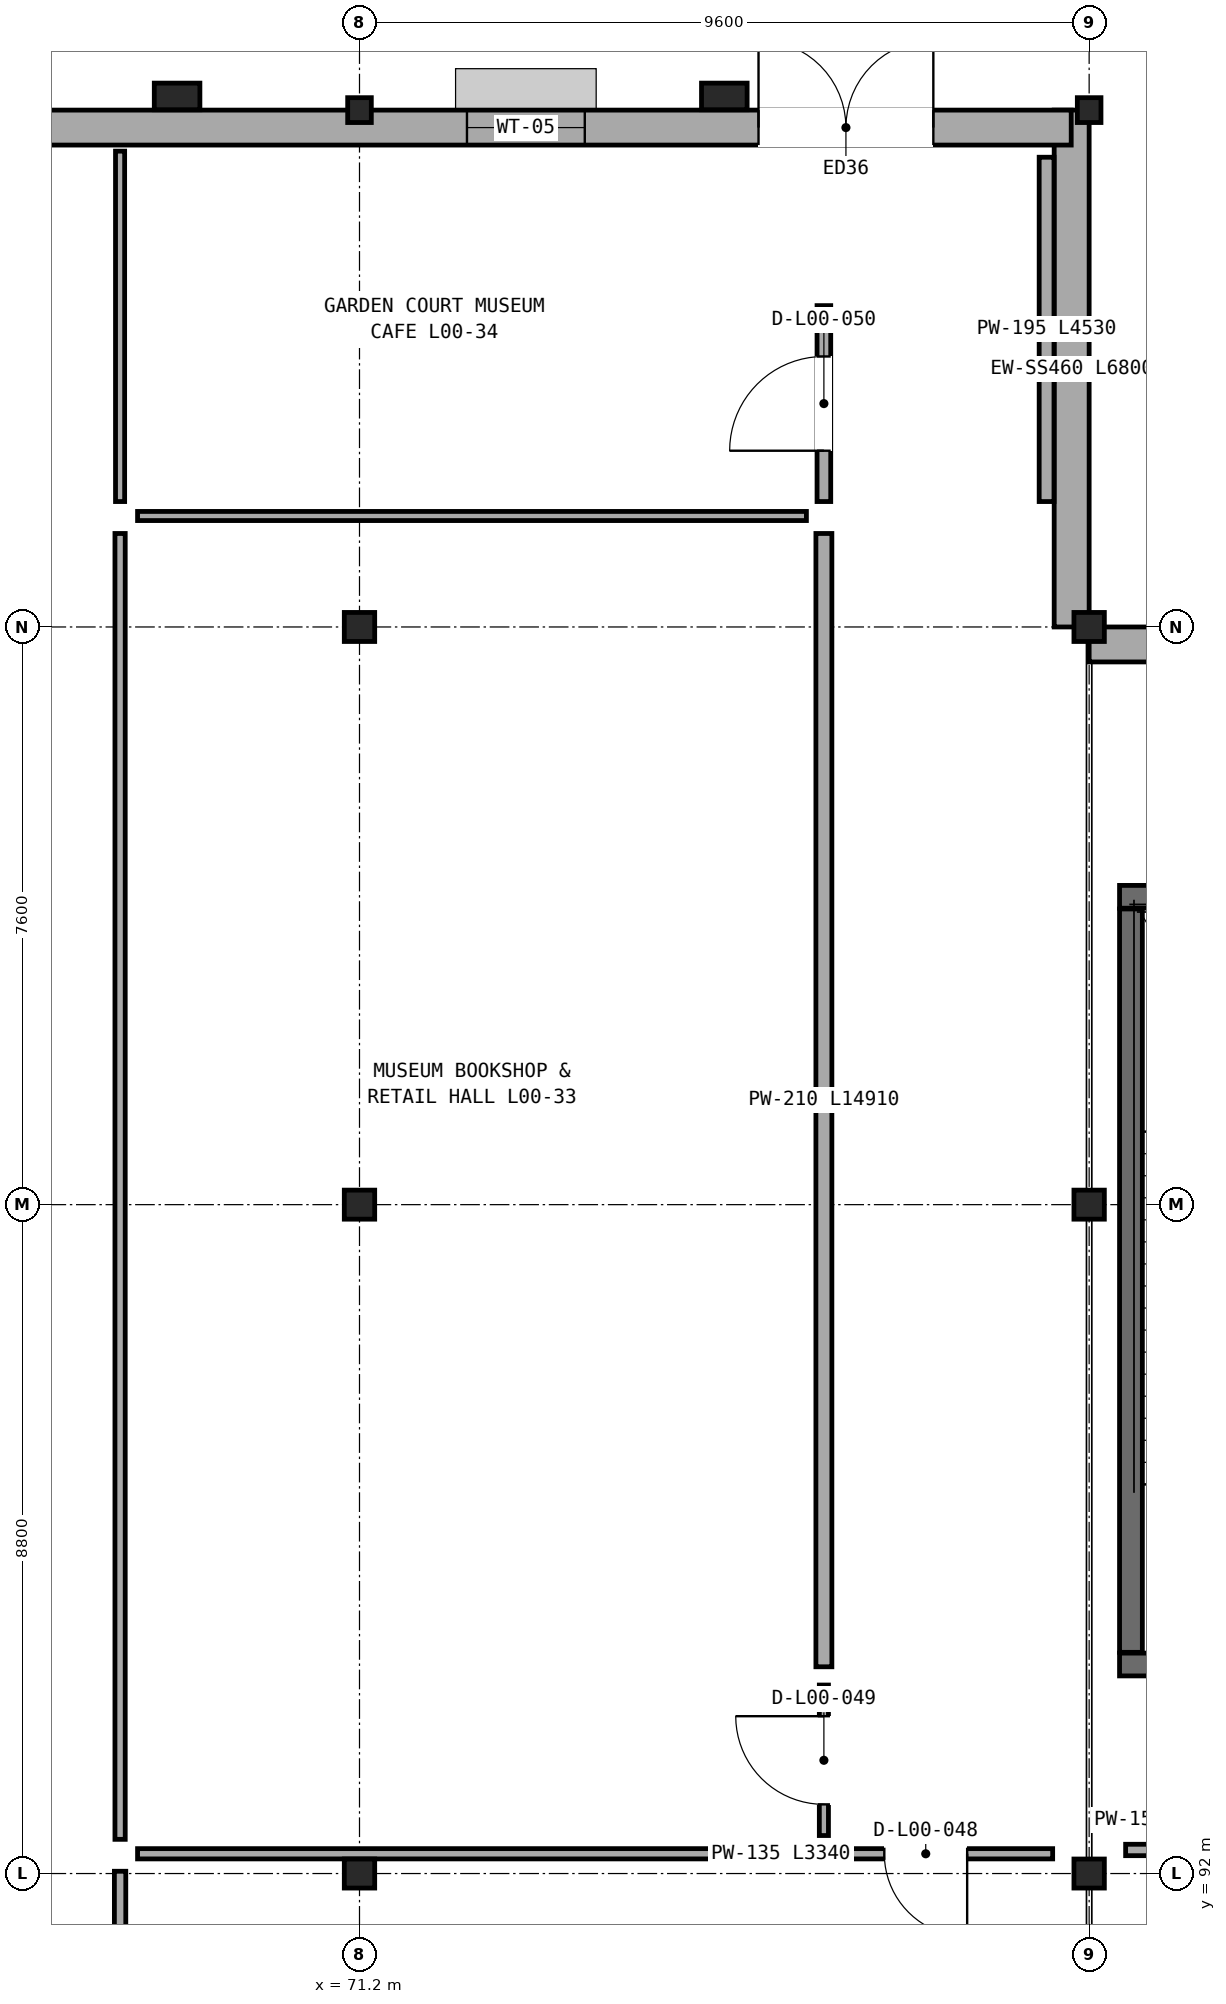
"""IFC4 building model, lengths in metres.
Left out: names, types, materials, properties, quantities, classifications, styles, units other than length and angle.
Written with IfcOpenShell. Run it as: python <this file> out.ifc"""

import sys

from ifc_helpers import new_model, si_unit, direction, frame, frame_2d, origin, origin_2d, place, context, subcontext, project, spatial, rectangle, i_section, extrude, element, fill, save


model = new_model("IFC4")
c1 = context("Model", 3, precision=1e-05, world=origin(), true_north=direction((0.0, 1.0)))
c2 = subcontext(c1, "Body", "Model", "MODEL_VIEW")
j1 = project(units=[si_unit("LENGTHUNIT", "METRE"), si_unit("PLANEANGLEUNIT", "RADIAN")], contexts=[c1])
p1 = place(None, origin())
s1 = spatial("IfcSite", under=j1, at=p1, CompositionType="ELEMENT")
p2 = place(p1, origin())
s2 = spatial("IfcBuilding", under=s1, at=p2, CompositionType="ELEMENT")
p3 = place(p2, origin())
s3 = spatial("IfcBuildingStorey", under=s2, at=p3, CompositionType="ELEMENT", Elevation=0.0)
for number, where, z_axis, x_axis in (
    (1, (71.2, 92.0, 0.0), (0.0, 0.0, 1.0), (1.0, 0.0, 0.0)),
    (2, (71.2, 100.8, 0.0), (0.0, 0.0, 1.0), (1.0, 0.0, 0.0)),
    (3, (71.2, 108.4, 0.0), (0.0, 0.0, 1.0), (1.0, 0.0, 0.0)),
):
    element("IfcColumn", number, at=place(p3, frame(where, z_axis=z_axis, x_axis=x_axis)), inside=s3, PredefinedType="COLUMN", context=c2, shape_type="SweptSolid", body=[
        extrude(i_section(OverallWidth=0.4, OverallDepth=0.382, WebThickness=0.025, FlangeThickness=0.036, at=origin_2d()), origin(), (0.0, 0.0, 1.0), 5.6),
    ])
p4 = place(p3, frame((71.2, 115.2, 0.0), z_axis=(0.0, 0.0, 1.0), x_axis=(1.0, 0.0, 0.0)))
e4 = element("IfcColumn", 4, at=p4, inside=s3, PredefinedType="COLUMN", context=c2, shape_type="SweptSolid", body=[
    extrude(i_section(OverallWidth=0.311, OverallDepth=0.327, WebThickness=0.016, FlangeThickness=0.025, FilletRadius=0.017, at=origin_2d()), origin(), (0.0, 0.0, 1.0), 5.6),
])
for number, where, z_axis, x_axis in (
    (5, (80.8, 92.0, 0.0), (0.0, 0.0, 1.0), (1.0, 0.0, 0.0)),
    (6, (80.8, 100.8, 0.0), (0.0, 0.0, 1.0), (1.0, 0.0, 0.0)),
    (7, (80.8, 108.4, 0.0), (0.0, 0.0, 1.0), (1.0, 0.0, 0.0)),
):
    element("IfcColumn", number, at=place(p3, frame(where, z_axis=z_axis, x_axis=x_axis)), inside=s3, PredefinedType="COLUMN", context=c2, shape_type="SweptSolid", body=[
        extrude(i_section(OverallWidth=0.4, OverallDepth=0.382, WebThickness=0.025, FlangeThickness=0.036, at=origin_2d()), origin(), (0.0, 0.0, 1.0), 5.6),
    ])
p5 = place(p3, frame((80.8, 115.2, 0.0), z_axis=(0.0, 0.0, 1.0), x_axis=(1.0, 0.0, 0.0)))
e8 = element("IfcColumn", 8, at=p5, inside=s3, PredefinedType="COLUMN", context=c2, shape_type="SweptSolid", body=[
    extrude(i_section(OverallWidth=0.311, OverallDepth=0.327, WebThickness=0.016, FlangeThickness=0.025, FilletRadius=0.017, at=origin_2d()), origin(), (0.0, 0.0, 1.0), 5.6),
])
for number, where, z_axis, x_axis in (
    (9, (68.8, 115.38, 0.0), (0.0, 0.0, 1.0), (1.0, 0.0, 0.0)),
    (10, (76.0, 115.38, 0.0), (0.0, 0.0, 1.0), (1.0, 0.0, 0.0)),
):
    element("IfcColumn", number, at=place(p3, frame(where, z_axis=z_axis, x_axis=x_axis)), inside=s3, PredefinedType="PILASTER", context=c2, shape_type="SweptSolid", body=[
        extrude(rectangle(XDim=0.6, YDim=0.35, at=origin_2d()), origin(), (0.0, 0.0, 1.0), 5.6),
    ])
p6 = place(p3, frame((119.2, 108.17, 0.0), z_axis=(0.0, 0.0, 1.0), x_axis=(-1.0, 0.0, 0.0)))
e11 = element("IfcWall", 11, at=p6, inside=s3, PredefinedType="SOLIDWALL", context=c2, shape_type="SweptSolid", body=[
    extrude(rectangle(XDim=38.4, YDim=0.46, at=frame_2d((19.2, 0.0))), origin(), (0.0, 0.0, 1.0), 4.653),
])
p7 = place(p6, frame((32.375, 0.0, 0.0)))
e12 = element("IfcOpeningElement", 12, at=p7, cuts=e11, PredefinedType="OPENING", context=c2, shape_type="SweptSolid", body=[
    extrude(rectangle(XDim=2.45, YDim=2.5, at=frame_2d((1.225, 1.25))), frame((0.0, 0.24, 0.0), z_axis=(0.0, -1.0, 0.0), x_axis=(1.0, 0.0, 0.0)), (0.0, 0.0, 1.0), 0.48),
])
p8 = place(p6, frame((22.8, 0.0, 0.0)))
e13 = element("IfcOpeningElement", 13, at=p8, cuts=e11, PredefinedType="OPENING", context=c2, shape_type="SweptSolid", body=[
    extrude(rectangle(XDim=2.4, YDim=2.45, at=frame_2d((1.2, 1.225))), frame((0.0, 0.24, 0.0), z_axis=(0.0, -1.0, 0.0), x_axis=(1.0, 0.0, 0.0)), (0.0, 0.0, 1.0), 0.48),
])
p9 = place(p6, frame((13.25, 0.0, 0.0)))
e14 = element("IfcOpeningElement", 14, at=p9, cuts=e11, PredefinedType="OPENING", context=c2, shape_type="SweptSolid", body=[
    extrude(rectangle(XDim=2.3, YDim=2.4, at=frame_2d((1.15, 1.2))), frame((0.0, 0.24, 0.0), z_axis=(0.0, -1.0, 0.0), x_axis=(1.0, 0.0, 0.0)), (0.0, 0.0, 1.0), 0.48),
])
p10 = place(p6, frame((3.55, 0.0, 0.0)))
e15 = element("IfcOpeningElement", 15, at=p10, cuts=e11, PredefinedType="OPENING", context=c2, shape_type="SweptSolid", body=[
    extrude(rectangle(XDim=2.5, YDim=2.55, at=frame_2d((1.25, 1.275))), frame((0.0, 0.24, 0.0), z_axis=(0.0, -1.0, 0.0), x_axis=(1.0, 0.0, 0.0)), (0.0, 0.0, 1.0), 0.48),
])
p11 = place(p6, frame((20.2, 0.0, 0.9)))
e16 = element("IfcOpeningElement", 16, at=p11, cuts=e11, PredefinedType="OPENING", context=c2, shape_type="SweptSolid", body=[
    extrude(rectangle(XDim=1.52, YDim=1.55, at=frame_2d((0.76, 0.775))), frame((0.0, 0.24, 0.0), z_axis=(0.0, -1.0, 0.0), x_axis=(1.0, 0.0, 0.0)), (0.0, 0.0, 1.0), 0.48),
])
p12 = place(p3, frame((80.57, 108.4, 0.0), z_axis=(0.0, 0.0, 1.0), x_axis=(0.0, 1.0, 0.0)))
e17 = element("IfcWall", 17, at=p12, inside=s3, PredefinedType="SOLIDWALL", context=c2, shape_type="SweptSolid", body=[
    extrude(rectangle(XDim=6.8, YDim=0.46, at=frame_2d((3.4, 0.0))), origin(), (0.0, 0.0, 1.0), 4.653),
])
p13 = place(p3, frame((80.564, 114.97, 0.0), z_axis=(0.0, 0.0, 1.0), x_axis=(-1.0, 0.0, 0.0)))
e18 = element("IfcWall", 18, at=p13, inside=s3, PredefinedType="SOLIDWALL", context=c2, shape_type="SweptSolid", body=[
    extrude(rectangle(XDim=38.164, YDim=0.46, at=frame_2d((19.082, 0.0))), origin(), (0.0, 0.0, 1.0), 4.732),
])
p14 = place(p13, frame((1.814, 0.0, 0.0)))
e19 = element("IfcOpeningElement", 19, at=p14, cuts=e18, PredefinedType="OPENING", context=c2, shape_type="SweptSolid", body=[
    extrude(rectangle(XDim=2.3, YDim=2.4, at=frame_2d((1.15, 1.2))), frame((0.0, 0.24, 0.0), z_axis=(0.0, -1.0, 0.0), x_axis=(1.0, 0.0, 0.0)), (0.0, 0.0, 1.0), 0.48),
])
p15 = place(p13, frame((6.4, 0.0, 0.9)))
e20 = element("IfcOpeningElement", 20, at=p15, cuts=e18, PredefinedType="OPENING", context=c2, shape_type="SweptSolid", body=[
    extrude(rectangle(XDim=1.55, YDim=1.55, at=frame_2d((0.775, 0.775))), frame((0.0, 0.24, 0.0), z_axis=(0.0, -1.0, 0.0), x_axis=(1.0, 0.0, 0.0)), (0.0, 0.0, 1.0), 0.48),
])
p16 = place(p13, frame((15.6, 0.0, 0.9)))
e21 = element("IfcOpeningElement", 21, at=p16, cuts=e18, PredefinedType="OPENING", context=c2, shape_type="SweptSolid", body=[
    extrude(rectangle(XDim=1.82, YDim=1.55, at=frame_2d((0.91, 0.775))), frame((0.0, 0.24, 0.0), z_axis=(0.0, -1.0, 0.0), x_axis=(1.0, 0.0, 0.0)), (0.0, 0.0, 1.0), 0.48),
])
p17 = place(p13, frame((20.2, 0.0, 0.9)))
e22 = element("IfcOpeningElement", 22, at=p17, cuts=e18, PredefinedType="OPENING", context=c2, shape_type="SweptSolid", body=[
    extrude(rectangle(XDim=1.85, YDim=1.55, at=frame_2d((0.925, 0.775))), frame((0.0, 0.24, 0.0), z_axis=(0.0, -1.0, 0.0), x_axis=(1.0, 0.0, 0.0)), (0.0, 0.0, 1.0), 0.48),
])
p18 = place(p13, frame((24.8, 0.0, 0.9)))
e23 = element("IfcOpeningElement", 23, at=p18, cuts=e18, PredefinedType="OPENING", context=c2, shape_type="SweptSolid", body=[
    extrude(rectangle(XDim=2.0, YDim=1.55, at=frame_2d((1.0, 0.775))), frame((0.0, 0.24, 0.0), z_axis=(0.0, -1.0, 0.0), x_axis=(1.0, 0.0, 0.0)), (0.0, 0.0, 1.0), 0.48),
])
p19 = place(p13, frame((29.4, 0.0, 0.9)))
e24 = element("IfcOpeningElement", 24, at=p19, cuts=e18, PredefinedType="OPENING", context=c2, shape_type="SweptSolid", body=[
    extrude(rectangle(XDim=2.2, YDim=1.55, at=frame_2d((1.1, 0.775))), frame((0.0, 0.24, 0.0), z_axis=(0.0, -1.0, 0.0), x_axis=(1.0, 0.0, 0.0)), (0.0, 0.0, 1.0), 0.48),
])
p20 = place(p3, frame((81.2, 94.75, 0.0), z_axis=(0.0, 0.0, 1.0), x_axis=(1.0, 0.0, 0.0)))
e25 = element("IfcWall", 25, at=p20, inside=s3, PredefinedType="SHEAR", context=c2, shape_type="SweptSolid", body=[
    extrude(rectangle(XDim=8.4, YDim=0.3, at=frame_2d((4.2, 0.0))), origin(), (0.0, 0.0, 1.0), 5.345),
])
p21 = place(p20, frame((1.925, 0.0, 0.0)))
e26 = element("IfcOpeningElement", 26, at=p21, cuts=e25, PredefinedType="OPENING", context=c2, shape_type="SweptSolid", body=[
    extrude(rectangle(XDim=1.25, YDim=2.2, at=frame_2d((0.625, 1.1))), frame((0.0, 0.16, 0.0), z_axis=(0.0, -1.0, 0.0), x_axis=(1.0, 0.0, 0.0)), (0.0, 0.0, 1.0), 0.32),
])
p22 = place(p20, frame((6.0, 0.0, 0.0)))
e27 = element("IfcOpeningElement", 27, at=p22, cuts=e25, PredefinedType="OPENING", context=c2, shape_type="SweptSolid", body=[
    extrude(rectangle(XDim=1.1, YDim=2.2, at=frame_2d((0.55, 1.1))), frame((0.0, 0.16, 0.0), z_axis=(0.0, -1.0, 0.0), x_axis=(1.0, 0.0, 0.0)), (0.0, 0.0, 1.0), 0.32),
])
p23 = place(p3, frame((89.6, 104.85, 0.0), z_axis=(0.0, 0.0, 1.0), x_axis=(-1.0, 0.0, 0.0)))
e28 = element("IfcWall", 28, at=p23, inside=s3, PredefinedType="SHEAR", context=c2, shape_type="SweptSolid", body=[
    extrude(rectangle(XDim=8.4, YDim=0.3, at=frame_2d((4.2, 0.0))), origin(), (0.0, 0.0, 1.0), 5.345),
])
p24 = place(p23, frame((1.3, 0.0, 0.0)))
e29 = element("IfcOpeningElement", 29, at=p24, cuts=e28, PredefinedType="OPENING", context=c2, shape_type="SweptSolid", body=[
    extrude(rectangle(XDim=1.1, YDim=2.2, at=frame_2d((0.55, 1.1))), frame((0.0, 0.16, 0.0), z_axis=(0.0, -1.0, 0.0), x_axis=(1.0, 0.0, 0.0)), (0.0, 0.0, 1.0), 0.32),
])
p25 = place(p3, frame((81.35, 104.69, 0.0), z_axis=(0.0, 0.0, 1.0), x_axis=(0.0, -1.0, 0.0)))
e30 = element("IfcWall", 30, at=p25, inside=s3, PredefinedType="SHEAR", context=c2, shape_type="SweptSolid", body=[
    extrude(rectangle(XDim=9.78, YDim=0.3, at=frame_2d((4.89, 0.0))), origin(), (0.0, 0.0, 1.0), 5.345),
])
p26 = place(p3, frame((81.28, 92.31, 0.0), z_axis=(0.0, 0.0, 1.0), x_axis=(1.0, 0.0, 0.0)))
e31 = element("IfcWall", 31, at=p26, inside=s3, PredefinedType="PARTITIONING", context=c2, shape_type="SweptSolid", body=[
    extrude(rectangle(XDim=4.6, YDim=0.15, at=frame_2d((2.3, 0.0))), origin(), (0.0, 0.0, 1.0), 4.708),
])
p27 = place(p26, frame((1.785, 0.0, 0.0)))
e32 = element("IfcOpeningElement", 32, at=p27, cuts=e31, PredefinedType="OPENING", context=c2, shape_type="SweptSolid", body=[
    extrude(rectangle(XDim=1.03, YDim=2.16, at=frame_2d((0.515, 1.08))), frame((0.0, 0.085, 0.0), z_axis=(0.0, -1.0, 0.0), x_axis=(1.0, 0.0, 0.0)), (0.0, 0.0, 1.0), 0.17),
])
p28 = place(p3, frame((76.98, 92.26, 0.0), z_axis=(0.0, 0.0, 1.0), x_axis=(1.0, 0.0, 0.0)))
e33 = element("IfcWall", 33, at=p28, inside=s3, PredefinedType="PARTITIONING", context=c2, shape_type="SweptSolid", body=[
    extrude(rectangle(XDim=3.34, YDim=0.135, at=frame_2d((1.67, 0.0))), origin(), (0.0, 0.0, 1.0), 4.638),
])
p29 = place(p28, frame((1.125, 0.0, 0.0)))
e34 = element("IfcOpeningElement", 34, at=p29, cuts=e33, PredefinedType="OPENING", context=c2, shape_type="SweptSolid", body=[
    extrude(rectangle(XDim=1.09, YDim=2.16, at=frame_2d((0.545, 1.08))), frame((0.0, 0.078, 0.0), z_axis=(0.0, -1.0, 0.0), x_axis=(1.0, 0.0, 0.0)), (0.0, 0.0, 1.0), 0.155),
])
p30 = place(p3, frame((77.31, 94.48, 0.0), z_axis=(0.0, 0.0, 1.0), x_axis=(0.0, -1.0, 0.0)))
e35 = element("IfcWall", 35, at=p30, inside=s3, PredefinedType="PARTITIONING", context=c2, shape_type="SweptSolid", body=[
    extrude(rectangle(XDim=1.98, YDim=0.12, at=frame_2d((0.99, 0.0))), origin(), (0.0, 0.0, 1.0), 5.23),
])
p31 = place(p30, frame((0.41, 0.0, 0.0)))
e36 = element("IfcOpeningElement", 36, at=p31, cuts=e35, PredefinedType="OPENING", context=c2, shape_type="SweptSolid", body=[
    extrude(rectangle(XDim=1.16, YDim=2.16, at=frame_2d((0.58, 1.08))), frame((0.0, 0.07, 0.0), z_axis=(0.0, -1.0, 0.0), x_axis=(1.0, 0.0, 0.0)), (0.0, 0.0, 1.0), 0.14),
])
p32 = place(p3, frame((77.31, 109.63, 0.0), z_axis=(0.0, 0.0, 1.0), x_axis=(0.0, -1.0, 0.0)))
e37 = element("IfcWall", 37, at=p32, inside=s3, PredefinedType="PARTITIONING", context=c2, shape_type="SweptSolid", body=[
    extrude(rectangle(XDim=14.91, YDim=0.21, at=frame_2d((7.455, 0.0))), origin(), (0.0, 0.0, 1.0), 4.638),
])
p33 = place(p3, frame((80.24, 110.05, 0.0), z_axis=(0.0, 0.0, 1.0), x_axis=(0.0, 1.0, 0.0)))
e38 = element("IfcWall", 38, at=p33, inside=s3, PredefinedType="PARTITIONING", context=c2, shape_type="SweptSolid", body=[
    extrude(rectangle(XDim=4.53, YDim=0.195, at=frame_2d((2.265, 0.0))), origin(), (0.0, 0.0, 1.0), 5.23),
])
p34 = place(p3, frame((77.31, 112.628, 0.0), z_axis=(0.0, 0.0, 1.0), x_axis=(0.0, -1.0, 0.0)))
e39 = element("IfcWall", 39, at=p34, inside=s3, PredefinedType="PARTITIONING", context=c2, shape_type="SweptSolid", body=[
    extrude(rectangle(XDim=2.578, YDim=0.18, at=frame_2d((1.289, 0.0))), origin(), (0.0, 0.0, 1.0), 5.23),
])
p35 = place(p34, frame((0.669, 0.0, 0.0)))
e40 = element("IfcOpeningElement", 40, at=p35, cuts=e39, PredefinedType="OPENING", context=c2, shape_type="SweptSolid", body=[
    extrude(rectangle(XDim=1.24, YDim=2.16, at=frame_2d((0.62, 1.08))), frame((0.0, 0.1, 0.0), z_axis=(0.0, -1.0, 0.0), x_axis=(1.0, 0.0, 0.0)), (0.0, 0.0, 1.0), 0.2),
])
p36 = place(p3, frame((68.05, 79.88, 0.0), z_axis=(0.0, 0.0, 1.0), x_axis=(0.0, 1.0, 0.0)))
e41 = element("IfcWall", 41, at=p36, inside=s3, PredefinedType="PARTITIONING", context=c2, shape_type="SweptSolid", body=[
    extrude(rectangle(XDim=12.15, YDim=0.15, at=frame_2d((6.075, 0.0))), origin(), (0.0, 0.0, 1.0), 4.638),
])
p37 = place(p3, frame((68.05, 92.45, 0.0), z_axis=(0.0, 0.0, 1.0), x_axis=(0.0, 1.0, 0.0)))
e42 = element("IfcWall", 42, at=p37, inside=s3, PredefinedType="PARTITIONING", context=c2, shape_type="SweptSolid", body=[
    extrude(rectangle(XDim=17.18, YDim=0.135, at=frame_2d((8.59, 0.0))), origin(), (0.0, 0.0, 1.0), 4.638),
])
p38 = place(p3, frame((68.05, 110.05, 0.0), z_axis=(0.0, 0.0, 1.0), x_axis=(0.0, 1.0, 0.0)))
e43 = element("IfcWall", 43, at=p38, inside=s3, PredefinedType="PARTITIONING", context=c2, shape_type="SweptSolid", body=[
    extrude(rectangle(XDim=4.61, YDim=0.12, at=frame_2d((2.305, 0.0))), origin(), (0.0, 0.0, 1.0), 5.23),
])
p39 = place(p3, frame((68.28, 92.26, 0.0), z_axis=(0.0, 0.0, 1.0), x_axis=(1.0, 0.0, 0.0)))
e44 = element("IfcWall", 44, at=p39, inside=s3, PredefinedType="PARTITIONING", context=c2, shape_type="SweptSolid", body=[
    extrude(rectangle(XDim=8.7, YDim=0.135, at=frame_2d((4.35, 0.0))), origin(), (0.0, 0.0, 1.0), 4.638),
])
p40 = place(p3, frame((68.28, 109.86, 0.0), z_axis=(0.0, 0.0, 1.0), x_axis=(1.0, 0.0, 0.0)))
e45 = element("IfcWall", 45, at=p40, inside=s3, PredefinedType="PARTITIONING", context=c2, shape_type="SweptSolid", body=[
    extrude(rectangle(XDim=8.8, YDim=0.12, at=frame_2d((4.4, 0.0))), origin(), (0.0, 0.0, 1.0), 4.717),
])
p41 = place(p14, frame((2.3, 0.0, 0.0), z_axis=(0.0, 0.0, 1.0), x_axis=(-1.0, 0.0, 0.0)))
e46 = element("IfcDoor", 46, at=p41, inside=s3, OperationType="DOUBLE_DOOR_SINGLE_SWING", PredefinedType="DOOR", context=c2, shape_type="SweptSolid", body=[
    extrude(rectangle(XDim=2.3, YDim=2.4, at=frame_2d((1.15, 1.2))), frame((0.0, 0.025, 0.0), z_axis=(0.0, -1.0, 0.0), x_axis=(1.0, 0.0, 0.0)), (0.0, 0.0, 1.0), 0.05),
])
fill(e19, e46)
p42 = place(p15, origin())
e47 = element("IfcWindow", 47, at=p42, inside=s3, PartitioningType="SINGLE_PANEL", PredefinedType="WINDOW", context=c2, shape_type="SweptSolid", body=[
    extrude(rectangle(XDim=1.55, YDim=1.55, at=frame_2d((0.775, 0.775))), frame((0.0, 0.03, 0.0), z_axis=(0.0, -1.0, 0.0), x_axis=(1.0, 0.0, 0.0)), (0.0, 0.0, 1.0), 0.06),
])
fill(e20, e47)
p43 = place(p29, frame((1.09, 0.0, 0.0), z_axis=(0.0, 0.0, 1.0), x_axis=(-1.0, 0.0, 0.0)))
e48 = element("IfcDoor", 48, at=p43, inside=s3, OperationType="SINGLE_SWING_RIGHT", PredefinedType="DOOR", context=c2, shape_type="SweptSolid", body=[
    extrude(rectangle(XDim=1.09, YDim=2.16, at=frame_2d((0.545, 1.08))), frame((0.0, 0.025, 0.0), z_axis=(0.0, -1.0, 0.0), x_axis=(1.0, 0.0, 0.0)), (0.0, 0.0, 1.0), 0.05),
])
fill(e34, e48)
p44 = place(p31, frame((1.16, 0.0, 0.0), z_axis=(0.0, 0.0, 1.0), x_axis=(-1.0, 0.0, 0.0)))
e49 = element("IfcDoor", 49, at=p44, inside=s3, OperationType="SINGLE_SWING_LEFT", PredefinedType="DOOR", context=c2, shape_type="SweptSolid", body=[
    extrude(rectangle(XDim=1.16, YDim=2.16, at=frame_2d((0.58, 1.08))), frame((0.0, 0.025, 0.0), z_axis=(0.0, -1.0, 0.0), x_axis=(1.0, 0.0, 0.0)), (0.0, 0.0, 1.0), 0.05),
])
fill(e36, e49)
p45 = place(p35, frame((1.24, 0.0, 0.0), z_axis=(0.0, 0.0, 1.0), x_axis=(-1.0, 0.0, 0.0)))
e50 = element("IfcDoor", 50, at=p45, inside=s3, OperationType="SINGLE_SWING_RIGHT", PredefinedType="DOOR", context=c2, shape_type="SweptSolid", body=[
    extrude(rectangle(XDim=1.24, YDim=2.16, at=frame_2d((0.62, 1.08))), frame((0.0, 0.025, 0.0), z_axis=(0.0, -1.0, 0.0), x_axis=(1.0, 0.0, 0.0)), (0.0, 0.0, 1.0), 0.05),
])
fill(e40, e50)
save(model, sys.argv[1])
